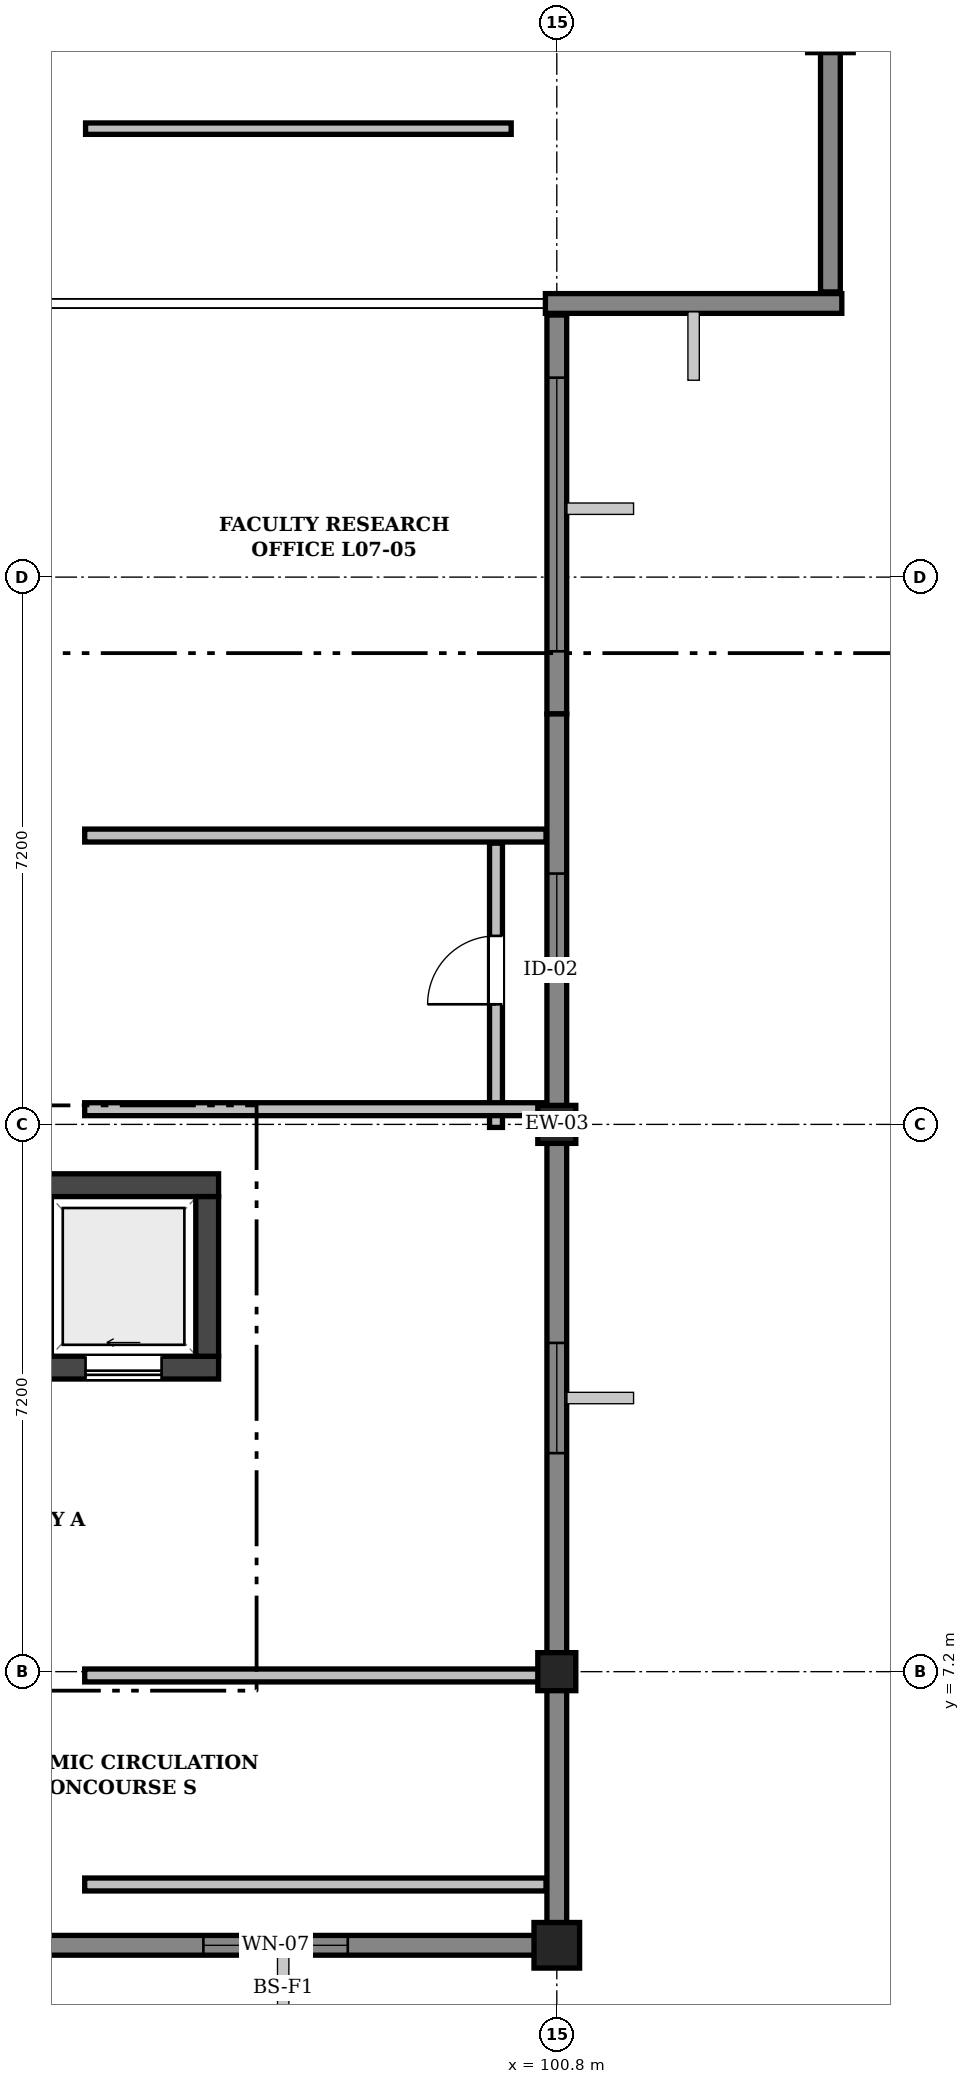
"""IFC4 building model, lengths in metres.
Left out: names, types, materials, properties, quantities, classifications, styles, units other than length and angle.
Written with IfcOpenShell. Run it as: python <this file> out.ifc"""

import sys

from ifc_helpers import new_model, si_unit, direction, frame, frame_2d, origin, origin_2d, place, context, subcontext, project, spatial, rectangle, extrude, element, fill, save


model = new_model("IFC4")
c1 = context("Model", 3, precision=1e-05, world=origin(), true_north=direction((0.0, 1.0)))
c2 = subcontext(c1, "Body", "Model", "MODEL_VIEW")
j1 = project(units=[si_unit("LENGTHUNIT", "METRE"), si_unit("PLANEANGLEUNIT", "RADIAN")], contexts=[c1])
p1 = place(None, origin())
s1 = spatial("IfcSite", under=j1, at=p1, CompositionType="ELEMENT")
p2 = place(p1, origin())
s2 = spatial("IfcBuilding", under=s1, at=p2, CompositionType="ELEMENT")
p3 = place(p2, frame((0.0, 0.0, 32.4)))
s3 = spatial("IfcBuildingStorey", under=s2, at=p3, CompositionType="ELEMENT", Elevation=32.4)
p4 = place(p3, frame((100.8, 3.6, 0.0), z_axis=(0.0, 0.0, 1.0), x_axis=(1.0, 0.0, 0.0)))
e1 = element("IfcColumn", 1, at=p4, inside=s3, PredefinedType="COLUMN", context=c2, shape_type="SweptSolid", body=[
    extrude(rectangle(XDim=0.6, YDim=0.6, at=origin_2d()), origin(), (0.0, 0.0, 1.0), 4.5),
])
for number, where, z_axis, x_axis in (
    (2, (100.8, 7.2, 0.0), (0.0, 0.0, 1.0), (1.0, 0.0, 0.0)),
    (3, (100.8, 14.4, 0.0), (0.0, 0.0, 1.0), (1.0, 0.0, 0.0)),
):
    element("IfcColumn", number, at=place(p3, frame(where, z_axis=z_axis, x_axis=x_axis)), inside=s3, PredefinedType="COLUMN", context=c2, shape_type="SweptSolid", body=[
        extrude(rectangle(XDim=0.5, YDim=0.5, at=origin_2d()), origin(), (0.0, 0.0, 1.0), 4.5),
    ])
p5 = place(p3, frame((100.95, 3.6, 0.0), z_axis=(0.0, 0.0, 1.0), x_axis=(-1.0, 0.0, 0.0)))
e4 = element("IfcWall", 4, at=p5, inside=s3, PredefinedType="SOLIDWALL", context=c2, shape_type="SweptSolid", body=[
    extrude(rectangle(XDim=7.35, YDim=0.26, at=frame_2d((3.675, 0.0))), origin(), (0.0, 0.0, 1.0), 4.22),
])
p6 = place(p5, frame((2.9, 0.0, 0.95)))
e5 = element("IfcOpeningElement", 5, at=p6, cuts=e4, PredefinedType="OPENING", context=c2, shape_type="SweptSolid", body=[
    extrude(rectangle(XDim=1.9, YDim=1.3, at=frame_2d((0.95, 0.65))), frame((0.0, 0.142, 0.0), z_axis=(0.0, -1.0, 0.0), x_axis=(1.0, 0.0, 0.0)), (0.0, 0.0, 1.0), 0.284),
])
p7 = place(p3, frame((104.4, 28.8, 0.0), z_axis=(0.0, 0.0, 1.0), x_axis=(0.0, -1.0, 0.0)))
e6 = element("IfcWall", 6, at=p7, inside=s3, PredefinedType="SOLIDWALL", context=c2, shape_type="SweptSolid", body=[
    extrude(rectangle(XDim=3.448, YDim=0.26, at=frame_2d((1.724, 0.0))), origin(), (0.0, 0.0, 1.0), 4.22),
])
p8 = place(p3, frame((104.55, 25.2, 0.0), z_axis=(0.0, 0.0, 1.0), x_axis=(-1.0, 0.0, 0.0)))
e7 = element("IfcWall", 7, at=p8, inside=s3, PredefinedType="SOLIDWALL", context=c2, shape_type="SweptSolid", body=[
    extrude(rectangle(XDim=3.9, YDim=0.26, at=frame_2d((1.95, 0.0))), origin(), (0.0, 0.0, 1.0), 4.22),
])
p9 = place(p3, frame((100.8, 25.048, 0.0), z_axis=(0.0, 0.0, 1.0), x_axis=(0.0, -1.0, 0.0)))
e8 = element("IfcWall", 8, at=p9, inside=s3, PredefinedType="SOLIDWALL", context=c2, shape_type="SweptSolid", body=[
    extrude(rectangle(XDim=5.248, YDim=0.26, at=frame_2d((2.624, 0.0))), origin(), (0.0, 0.0, 1.0), 4.22),
])
p10 = place(p9, frame((0.824, 0.0, 0.95)))
e9 = element("IfcOpeningElement", 9, at=p10, cuts=e8, PredefinedType="OPENING", context=c2, shape_type="SweptSolid", body=[
    extrude(rectangle(XDim=3.6, YDim=1.55, at=frame_2d((1.8, 0.775))), frame((0.0, 0.142, 0.0), z_axis=(0.0, -1.0, 0.0), x_axis=(1.0, 0.0, 0.0)), (0.0, 0.0, 1.0), 0.284),
])
p11 = place(p3, frame((100.8, 19.8, 0.0), z_axis=(0.0, 0.0, 1.0), x_axis=(0.0, -1.0, 0.0)))
e10 = element("IfcWall", 10, at=p11, inside=s3, PredefinedType="SOLIDWALL", context=c2, shape_type="SweptSolid", body=[
    extrude(rectangle(XDim=5.4, YDim=0.26, at=frame_2d((2.7, 0.0))), origin(), (0.0, 0.0, 1.0), 4.22),
])
p12 = place(p11, frame((2.1, 0.0, 0.95)))
e11 = element("IfcOpeningElement", 11, at=p12, cuts=e10, PredefinedType="OPENING", context=c2, shape_type="SweptSolid", body=[
    extrude(rectangle(XDim=1.2, YDim=1.8, at=frame_2d((0.6, 0.9))), frame((0.0, 0.142, 0.0), z_axis=(0.0, -1.0, 0.0), x_axis=(1.0, 0.0, 0.0)), (0.0, 0.0, 1.0), 0.284),
])
p13 = place(p3, frame((100.8, 14.4, 0.0), z_axis=(0.0, 0.0, 1.0), x_axis=(0.0, -1.0, 0.0)))
e12 = element("IfcWall", 12, at=p13, inside=s3, PredefinedType="SOLIDWALL", context=c2, shape_type="SweptSolid", body=[
    extrude(rectangle(XDim=7.2, YDim=0.26, at=frame_2d((3.6, 0.0))), origin(), (0.0, 0.0, 1.0), 4.22),
])
p14 = place(p13, frame((2.875, 0.0, 0.95)))
e13 = element("IfcOpeningElement", 13, at=p14, cuts=e12, PredefinedType="OPENING", context=c2, shape_type="SweptSolid", body=[
    extrude(rectangle(XDim=1.45, YDim=1.8, at=frame_2d((0.725, 0.9))), frame((0.0, 0.142, 0.0), z_axis=(0.0, -1.0, 0.0), x_axis=(1.0, 0.0, 0.0)), (0.0, 0.0, 1.0), 0.284),
])
p15 = place(p3, frame((100.8, 7.2, 0.0), z_axis=(0.0, 0.0, 1.0), x_axis=(0.0, -1.0, 0.0)))
e14 = element("IfcWall", 14, at=p15, inside=s3, PredefinedType="SOLIDWALL", context=c2, shape_type="SweptSolid", body=[
    extrude(rectangle(XDim=3.448, YDim=0.26, at=frame_2d((1.724, 0.0))), origin(), (0.0, 0.0, 1.0), 4.22),
])
p16 = place(p3, frame((93.85, 11.2, 0.0), z_axis=(0.0, 0.0, 1.0), x_axis=(1.0, 0.0, 0.0)))
e15 = element("IfcWall", 15, at=p16, inside=s3, PredefinedType="SHEAR", context=c2, shape_type="SweptSolid", body=[
    extrude(rectangle(XDim=2.5, YDim=0.3, at=frame_2d((1.25, 0.0))), origin(), (0.0, 0.0, 1.0), 4.25),
])
p17 = place(p16, frame((0.75, 0.0, 0.0)))
e16 = element("IfcOpeningElement", 16, at=p17, cuts=e15, PredefinedType="OPENING", context=c2, shape_type="SweptSolid", body=[
    extrude(rectangle(XDim=1.0, YDim=2.1, at=frame_2d((0.5, 1.05))), frame((0.0, 0.162, 0.0), z_axis=(0.0, -1.0, 0.0), x_axis=(1.0, 0.0, 0.0)), (0.0, 0.0, 1.0), 0.324),
])
p18 = place(p3, frame((93.85, 13.6, 0.0), z_axis=(0.0, 0.0, 1.0), x_axis=(1.0, 0.0, 0.0)))
e17 = element("IfcWall", 17, at=p18, inside=s3, PredefinedType="SHEAR", context=c2, shape_type="SweptSolid", body=[
    extrude(rectangle(XDim=2.5, YDim=0.3, at=frame_2d((1.25, 0.0))), origin(), (0.0, 0.0, 1.0), 4.25),
])
p19 = place(p3, frame((96.2, 11.35, 0.0), z_axis=(0.0, 0.0, 1.0), x_axis=(0.0, 1.0, 0.0)))
e18 = element("IfcWall", 18, at=p19, inside=s3, PredefinedType="SHEAR", context=c2, shape_type="SweptSolid", body=[
    extrude(rectangle(XDim=2.1, YDim=0.3, at=frame_2d((1.05, 0.0))), origin(), (0.0, 0.0, 1.0), 4.25),
])
p20 = place(p3, frame((94.588, 18.2, 0.0), z_axis=(0.0, 0.0, 1.0), x_axis=(1.0, 0.0, 0.0)))
e19 = element("IfcWall", 19, at=p20, inside=s3, PredefinedType="PARTITIONING", context=c2, shape_type="SweptSolid", body=[
    extrude(rectangle(XDim=6.07, YDim=0.17, at=frame_2d((3.035, 0.0))), origin(), (0.0, 0.0, 1.0), 4.16),
])
p21 = place(p3, frame((100.0, 14.36, 0.0), z_axis=(0.0, 0.0, 1.0), x_axis=(0.0, 1.0, 0.0)))
e20 = element("IfcWall", 20, at=p21, inside=s3, PredefinedType="PARTITIONING", context=c2, shape_type="SweptSolid", body=[
    extrude(rectangle(XDim=3.74, YDim=0.17, at=frame_2d((1.87, 0.0))), origin(), (0.0, 0.0, 1.0), 4.16),
])
p22 = place(p21, frame((1.62, 0.0, 0.0)))
e21 = element("IfcOpeningElement", 21, at=p22, cuts=e20, PredefinedType="OPENING", context=c2, shape_type="SweptSolid", body=[
    extrude(rectangle(XDim=0.9, YDim=2.08, at=frame_2d((0.45, 1.04))), frame((0.0, 0.097, 0.0), z_axis=(0.0, -1.0, 0.0), x_axis=(1.0, 0.0, 0.0)), (0.0, 0.0, 1.0), 0.194),
])
p23 = place(p3, frame((94.588, 14.6, 0.0), z_axis=(0.0, 0.0, 1.0), x_axis=(1.0, 0.0, 0.0)))
e22 = element("IfcWall", 22, at=p23, inside=s3, PredefinedType="PARTITIONING", context=c2, shape_type="SweptSolid", body=[
    extrude(rectangle(XDim=6.07, YDim=0.17, at=frame_2d((3.035, 0.0))), origin(), (0.0, 0.0, 1.0), 3.78),
])
p24 = place(p3, frame((94.588, 4.4, 0.0), z_axis=(0.0, 0.0, 1.0), x_axis=(1.0, 0.0, 0.0)))
e23 = element("IfcWall", 23, at=p24, inside=s3, PredefinedType="PARTITIONING", context=c2, shape_type="SweptSolid", body=[
    extrude(rectangle(XDim=6.07, YDim=0.17, at=frame_2d((3.035, 0.0))), origin(), (0.0, 0.0, 1.0), 4.16),
])
p25 = place(p3, frame((94.588, 7.15, 0.0), z_axis=(0.0, 0.0, 1.0), x_axis=(1.0, 0.0, 0.0)))
e24 = element("IfcWall", 24, at=p25, inside=s3, PredefinedType="PARTITIONING", context=c2, shape_type="SweptSolid", body=[
    extrude(rectangle(XDim=6.07, YDim=0.17, at=frame_2d((3.035, 0.0))), origin(), (0.0, 0.0, 1.0), 3.78),
])
p26 = place(p3, frame((94.6, 27.5, 0.0), z_axis=(0.0, 0.0, 1.0), x_axis=(1.0, 0.0, 0.0)))
e25 = element("IfcWall", 25, at=p26, inside=s3, PredefinedType="PARTITIONING", context=c2, shape_type="SweptSolid", body=[
    extrude(rectangle(XDim=5.6, YDim=0.15, at=frame_2d((2.8, 0.0))), origin(), (0.0, 0.0, 1.0), 4.16),
])
p27 = place(p6, origin())
e26 = element("IfcWindow", 26, at=p27, inside=s3, PartitioningType="SINGLE_PANEL", PredefinedType="WINDOW", context=c2, shape_type="SweptSolid", body=[
    extrude(rectangle(XDim=1.9, YDim=1.3, at=frame_2d((0.95, 0.65))), frame((0.0, 0.03, 0.0), z_axis=(0.0, -1.0, 0.0), x_axis=(1.0, 0.0, 0.0)), (0.0, 0.0, 1.0), 0.06),
])
fill(e5, e26)
p28 = place(p10, origin())
e27 = element("IfcWindow", 27, at=p28, inside=s3, PartitioningType="SINGLE_PANEL", PredefinedType="WINDOW", context=c2, shape_type="SweptSolid", body=[
    extrude(rectangle(XDim=3.6, YDim=1.55, at=frame_2d((1.8, 0.775))), frame((0.0, 0.03, 0.0), z_axis=(0.0, -1.0, 0.0), x_axis=(1.0, 0.0, 0.0)), (0.0, 0.0, 1.0), 0.06),
])
fill(e9, e27)
p29 = place(p12, origin())
e28 = element("IfcWindow", 28, at=p29, inside=s3, PartitioningType="SINGLE_PANEL", PredefinedType="WINDOW", context=c2, shape_type="SweptSolid", body=[
    extrude(rectangle(XDim=1.2, YDim=1.8, at=frame_2d((0.6, 0.9))), frame((0.0, 0.03, 0.0), z_axis=(0.0, -1.0, 0.0), x_axis=(1.0, 0.0, 0.0)), (0.0, 0.0, 1.0), 0.06),
])
fill(e11, e28)
p30 = place(p14, origin())
e29 = element("IfcWindow", 29, at=p30, inside=s3, PartitioningType="SINGLE_PANEL", PredefinedType="WINDOW", context=c2, shape_type="SweptSolid", body=[
    extrude(rectangle(XDim=1.45, YDim=1.8, at=frame_2d((0.725, 0.9))), frame((0.0, 0.03, 0.0), z_axis=(0.0, -1.0, 0.0), x_axis=(1.0, 0.0, 0.0)), (0.0, 0.0, 1.0), 0.06),
])
fill(e13, e29)
p31 = place(p17, frame((1.0, 0.0, 0.0), z_axis=(0.0, 0.0, 1.0), x_axis=(-1.0, 0.0, 0.0)))
e30 = element("IfcDoor", 30, at=p31, inside=s3, OperationType="SLIDING_TO_LEFT", PredefinedType="DOOR", context=c2, shape_type="SweptSolid", body=[
    extrude(rectangle(XDim=1.0, YDim=2.1, at=frame_2d((0.5, 1.05))), frame((0.0, 0.025, 0.0), z_axis=(0.0, -1.0, 0.0), x_axis=(1.0, 0.0, 0.0)), (0.0, 0.0, 1.0), 0.05),
])
fill(e16, e30)
p32 = place(p22, origin())
e31 = element("IfcDoor", 31, at=p32, inside=s3, OperationType="SINGLE_SWING_LEFT", PredefinedType="DOOR", context=c2, shape_type="SweptSolid", body=[
    extrude(rectangle(XDim=0.9, YDim=2.08, at=frame_2d((0.45, 1.04))), frame((0.0, 0.025, 0.0), z_axis=(0.0, -1.0, 0.0), x_axis=(1.0, 0.0, 0.0)), (0.0, 0.0, 1.0), 0.05),
])
fill(e21, e31)
save(model, sys.argv[1])
